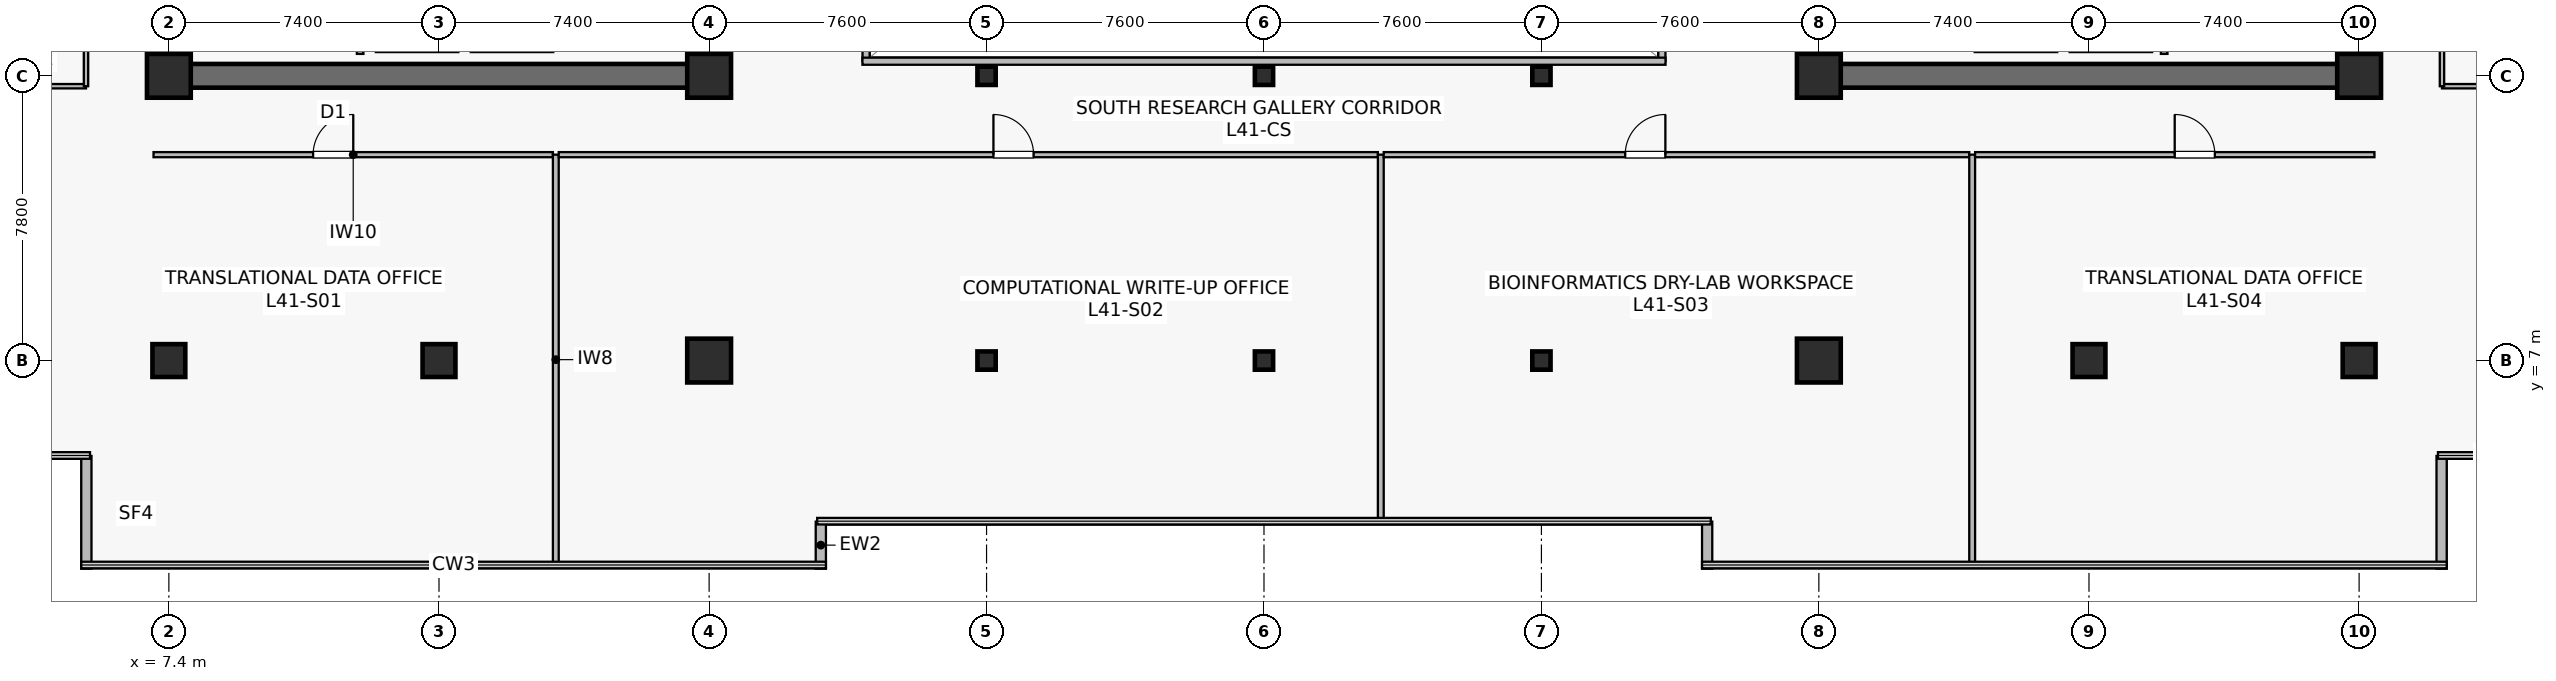
"""IFC4 building model, lengths in metres.
Left out: names, types, materials, properties, quantities, classifications, styles, units other than length and angle.
Written with IfcOpenShell. Run it as: python <this file> out.ifc"""

import sys

from ifc_helpers import new_model, si_unit, direction, frame, frame_2d, origin, origin_2d, place, context, subcontext, project, spatial, rectangle, hollow_rectangle, extrude, source, transform, mapped, element, fill, save


model = new_model("IFC4")
c1 = context("Model", 3, precision=1e-05, world=origin(), true_north=direction((0.0, 1.0)))
c2 = subcontext(c1, "Body", "Model", "MODEL_VIEW")
j1 = project(units=[si_unit("LENGTHUNIT", "METRE"), si_unit("PLANEANGLEUNIT", "RADIAN")], contexts=[c1])
p1 = place(None, origin())
s1 = spatial("IfcSite", under=j1, at=p1, CompositionType="ELEMENT")
p2 = place(p1, origin())
s2 = spatial("IfcBuilding", under=s1, at=p2, CompositionType="ELEMENT")
p3 = place(p2, frame((0.0, 0.0, 170.7)))
s3 = spatial("IfcBuildingStorey", under=s2, at=p3, CompositionType="ELEMENT", Elevation=170.7)
p4 = place(p3, frame((7.075, 14.8, 0.0), z_axis=(0.0, 0.0, 1.0), x_axis=(1.0, 0.0, 0.0)))
e1 = element("IfcWall", 1, at=p4, inside=s3, PredefinedType="SHEAR", context=c2, shape_type="SweptSolid", body=[
    extrude(rectangle(XDim=15.45, YDim=0.65, at=frame_2d((7.725, 0.0))), origin(), (0.0, 0.0, 1.0), 3.79),
])
p5 = place(p3, frame((7.4, 15.125, 0.0), z_axis=(0.0, 0.0, 1.0), x_axis=(0.0, 1.0, 0.0)))
e2 = element("IfcWall", 2, at=p5, inside=s3, PredefinedType="SHEAR", context=c2, shape_type="SweptSolid", body=[
    extrude(rectangle(XDim=18.35, YDim=0.65, at=frame_2d((9.175, 0.0))), origin(), (0.0, 0.0, 1.0), 3.79),
])
p6 = place(p3, frame((22.2, 15.125, 0.0), z_axis=(0.0, 0.0, 1.0), x_axis=(0.0, 1.0, 0.0)))
e3 = element("IfcWall", 3, at=p6, inside=s3, PredefinedType="SHEAR", context=c2, shape_type="SweptSolid", body=[
    extrude(rectangle(XDim=18.35, YDim=0.65, at=frame_2d((9.175, 0.0))), origin(), (0.0, 0.0, 1.0), 3.79),
])
p7 = place(p6, frame((3.425, 0.0, 0.0)))
e4 = element("IfcOpeningElement", 4, at=p7, cuts=e3, PredefinedType="OPENING", context=c2, shape_type="SweptSolid", body=[
    extrude(rectangle(XDim=1.42, YDim=2.2, at=frame_2d((0.71, 1.1))), frame((0.0, 0.335, 0.0), z_axis=(0.0, -1.0, 0.0), x_axis=(1.0, 0.0, 0.0)), (0.0, 0.0, 1.0), 0.67),
])
p8 = place(p3, frame((52.275, 14.8, 0.0), z_axis=(0.0, 0.0, 1.0), x_axis=(1.0, 0.0, 0.0)))
e5 = element("IfcWall", 5, at=p8, inside=s3, PredefinedType="SHEAR", context=c2, shape_type="SweptSolid", body=[
    extrude(rectangle(XDim=15.45, YDim=0.65, at=frame_2d((7.725, 0.0))), origin(), (0.0, 0.0, 1.0), 3.79),
])
p9 = place(p3, frame((52.6, 15.125, 0.0), z_axis=(0.0, 0.0, 1.0), x_axis=(0.0, 1.0, 0.0)))
e6 = element("IfcWall", 6, at=p9, inside=s3, PredefinedType="SHEAR", context=c2, shape_type="SweptSolid", body=[
    extrude(rectangle(XDim=18.35, YDim=0.65, at=frame_2d((9.175, 0.0))), origin(), (0.0, 0.0, 1.0), 3.79),
])
p10 = place(p9, frame((3.425, 0.0, 0.0)))
e7 = element("IfcOpeningElement", 7, at=p10, cuts=e6, PredefinedType="OPENING", context=c2, shape_type="SweptSolid", body=[
    extrude(rectangle(XDim=1.42, YDim=2.2, at=frame_2d((0.71, 1.1))), frame((0.0, 0.335, 0.0), z_axis=(0.0, -1.0, 0.0), x_axis=(1.0, 0.0, 0.0)), (0.0, 0.0, 1.0), 0.67),
])
p11 = place(p3, frame((67.4, 15.125, 0.0), z_axis=(0.0, 0.0, 1.0), x_axis=(0.0, 1.0, 0.0)))
e8 = element("IfcWall", 8, at=p11, inside=s3, PredefinedType="SHEAR", context=c2, shape_type="SweptSolid", body=[
    extrude(rectangle(XDim=18.35, YDim=0.65, at=frame_2d((9.175, 0.0))), origin(), (0.0, 0.0, 1.0), 3.79),
])
m1 = source(origin(), c2, "Body", "SweptSolid", [
    extrude(rectangle(XDim=0.9, YDim=0.9, at=origin_2d()), origin(), (0.0, 0.0, 1.0), 4.1),
])
p12 = place(p3, frame((14.8, 7.0, 0.0), z_axis=(0.0, 0.0, 1.0), x_axis=(1.0, 0.0, 0.0)))
e9 = element("IfcColumn", 9, at=p12, inside=s3, PredefinedType="COLUMN", context=c2, shape_type="MappedRepresentation", body=[
    mapped(m1, transform((0.0, 0.0, 0.0), scale=1.0)),
])
m2 = source(origin(), c2, "Body", "SweptSolid", [
    extrude(rectangle(XDim=1.2, YDim=1.2, at=origin_2d()), origin(), (0.0, 0.0, 1.0), 4.1),
])
for number, where, z_axis, x_axis in (
    (10, (22.2, 7.0, 0.0), (0.0, 0.0, 1.0), (1.0, 0.0, 0.0)),
    (11, (7.4, 14.8, 0.0), (0.0, 0.0, 1.0), (1.0, 0.0, 0.0)),
    (12, (22.2, 14.8, 0.0), (0.0, 0.0, 1.0), (1.0, 0.0, 0.0)),
    (13, (52.6, 7.0, 0.0), (0.0, 0.0, 1.0), (1.0, 0.0, 0.0)),
):
    element("IfcColumn", number, at=place(p3, frame(where, z_axis=z_axis, x_axis=x_axis)), inside=s3, PredefinedType="COLUMN", context=c2, shape_type="MappedRepresentation", body=[
        mapped(m2, transform((0.0, 0.0, 0.0), scale=1.0)),
    ])
p13 = place(p3, frame((60.0, 7.0, 0.0), z_axis=(0.0, 0.0, 1.0), x_axis=(1.0, 0.0, 0.0)))
e14 = element("IfcColumn", 14, at=p13, inside=s3, PredefinedType="COLUMN", context=c2, shape_type="MappedRepresentation", body=[
    mapped(m1, transform((0.0, 0.0, 0.0), scale=1.0)),
])
for number, where, z_axis, x_axis in (
    (15, (52.6, 14.8, 0.0), (0.0, 0.0, 1.0), (1.0, 0.0, 0.0)),
    (16, (67.4, 14.8, 0.0), (0.0, 0.0, 1.0), (1.0, 0.0, 0.0)),
):
    element("IfcColumn", number, at=place(p3, frame(where, z_axis=z_axis, x_axis=x_axis)), inside=s3, PredefinedType="COLUMN", context=c2, shape_type="MappedRepresentation", body=[
        mapped(m2, transform((0.0, 0.0, 0.0), scale=1.0)),
    ])
for number, where, z_axis, x_axis in (
    (17, (7.4, 7.0, 0.0), (0.0, 0.0, 1.0), (1.0, 0.0, 0.0)),
    (18, (67.4, 7.0, 0.0), (0.0, 0.0, 1.0), (1.0, 0.0, 0.0)),
):
    element("IfcColumn", number, at=place(p3, frame(where, z_axis=z_axis, x_axis=x_axis)), inside=s3, PredefinedType="COLUMN", context=c2, shape_type="MappedRepresentation", body=[
        mapped(m1, transform((0.0, 0.0, 0.0), scale=1.0)),
    ])
m3 = source(origin(), c2, "Body", "SweptSolid", [
    extrude(hollow_rectangle(XDim=0.5, YDim=0.5, WallThickness=0.022, at=origin_2d()), origin(), (0.0, 0.0, 1.0), 4.1),
])
for number, where, z_axis, x_axis in (
    (19, (29.8, 7.0, 0.0), (0.0, 0.0, 1.0), (1.0, 0.0, 0.0)),
    (20, (29.8, 14.8, 0.0), (0.0, 0.0, 1.0), (1.0, 0.0, 0.0)),
    (21, (37.4, 7.0, 0.0), (0.0, 0.0, 1.0), (1.0, 0.0, 0.0)),
    (22, (37.4, 14.8, 0.0), (0.0, 0.0, 1.0), (1.0, 0.0, 0.0)),
    (23, (45.0, 7.0, 0.0), (0.0, 0.0, 1.0), (1.0, 0.0, 0.0)),
    (24, (45.0, 14.8, 0.0), (0.0, 0.0, 1.0), (1.0, 0.0, 0.0)),
):
    element("IfcColumn", number, at=place(p3, frame(where, z_axis=z_axis, x_axis=x_axis)), inside=s3, PredefinedType="COLUMN", context=c2, shape_type="MappedRepresentation", body=[
        mapped(m3, transform((0.0, 0.0, 0.0), scale=1.0)),
    ])
for number, where, z_axis, x_axis in (
    (25, (25.26, 1.3, 0.0), (0.0, 0.0, 1.0), (0.0, 1.0, 0.0)),
    (26, (49.54, 2.588, 0.0), (0.0, 0.0, 1.0), (0.0, -1.0, 0.0)),
):
    element("IfcWall", number, at=place(p3, frame(where, z_axis=z_axis, x_axis=x_axis)), inside=s3, PredefinedType="STANDARD", context=c2, shape_type="SweptSolid", body=[
        extrude(rectangle(XDim=1.288, YDim=0.28, at=frame_2d((0.644, 0.0))), origin(), (0.0, 0.0, 1.0), 3.79),
    ])
for number, where, z_axis, x_axis in (
    (27, (69.66, 1.3, 0.0), (0.0, 0.0, 1.0), (0.0, 1.0, 0.0)),
    (28, (5.14, 4.388, 0.0), (0.0, 0.0, 1.0), (0.0, -1.0, 0.0)),
):
    element("IfcWall", number, at=place(p3, frame(where, z_axis=z_axis, x_axis=x_axis)), inside=s3, PredefinedType="STANDARD", context=c2, shape_type="SweptSolid", body=[
        extrude(rectangle(XDim=3.088, YDim=0.28, at=frame_2d((1.544, 0.0))), origin(), (0.0, 0.0, 1.0), 3.79),
    ])
p14 = place(p3, frame((13.07, 15.55, 0.0), z_axis=(0.0, 0.0, 1.0), x_axis=(1.0, 0.0, 0.0)))
e29 = element("IfcWall", 29, at=p14, inside=s3, PredefinedType="SOLIDWALL", context=c2, shape_type="SweptSolid", body=[
    extrude(rectangle(XDim=2.26, YDim=0.2, at=frame_2d((1.13, 0.0))), origin(), (0.0, 0.0, 1.0), 3.187),
])
p15 = place(p3, frame((15.67, 15.55, 0.0), z_axis=(0.0, 0.0, 1.0), x_axis=(1.0, 0.0, 0.0)))
e30 = element("IfcWall", 30, at=p15, inside=s3, PredefinedType="SOLIDWALL", context=c2, shape_type="SweptSolid", body=[
    extrude(rectangle(XDim=2.26, YDim=0.2, at=frame_2d((1.13, 0.0))), origin(), (0.0, 0.0, 1.0), 3.79),
])
p16 = place(p3, frame((12.64, 15.4, 0.0), z_axis=(0.0, 0.0, 1.0), x_axis=(0.0, 1.0, 0.0)))
e31 = element("IfcWall", 31, at=p16, inside=s3, PredefinedType="SOLIDWALL", context=c2, shape_type="SweptSolid", body=[
    extrude(rectangle(XDim=2.4, YDim=0.18, at=frame_2d((1.2, 0.0))), origin(), (0.0, 0.0, 1.0), 3.79),
])
p17 = place(p3, frame((59.47, 15.55, 0.0), z_axis=(0.0, 0.0, 1.0), x_axis=(1.0, 0.0, 0.0)))
e32 = element("IfcWall", 32, at=p17, inside=s3, PredefinedType="SOLIDWALL", context=c2, shape_type="SweptSolid", body=[
    extrude(rectangle(XDim=2.26, YDim=0.2, at=frame_2d((1.13, 0.0))), origin(), (0.0, 0.0, 1.0), 3.187),
])
p18 = place(p3, frame((56.87, 15.55, 0.0), z_axis=(0.0, 0.0, 1.0), x_axis=(1.0, 0.0, 0.0)))
e33 = element("IfcWall", 33, at=p18, inside=s3, PredefinedType="SOLIDWALL", context=c2, shape_type="SweptSolid", body=[
    extrude(rectangle(XDim=2.26, YDim=0.2, at=frame_2d((1.13, 0.0))), origin(), (0.0, 0.0, 1.0), 3.79),
])
p19 = place(p3, frame((62.06, 15.4, 0.0), z_axis=(0.0, 0.0, 1.0), x_axis=(0.0, 1.0, 0.0)))
e34 = element("IfcWall", 34, at=p19, inside=s3, PredefinedType="SOLIDWALL", context=c2, shape_type="SweptSolid", body=[
    extrude(rectangle(XDim=2.4, YDim=0.18, at=frame_2d((1.2, 0.0))), origin(), (0.0, 0.0, 1.0), 3.79),
])
p20 = place(p3, frame((26.5, 15.2, 0.0), z_axis=(0.0, 0.0, 1.0), x_axis=(0.0, 1.0, 0.0)))
e35 = element("IfcWall", 35, at=p20, inside=s3, PredefinedType="SOLIDWALL", context=c2, shape_type="SweptSolid", body=[
    extrude(rectangle(XDim=18.2, YDim=0.195, at=frame_2d((9.1, 0.0))), origin(), (0.0, 0.0, 1.0), 3.79),
])
p21 = place(p20, frame((1.8, 0.0, 0.9)))
e36 = element("IfcOpeningElement", 36, at=p21, cuts=e35, PredefinedType="OPENING", context=c2, shape_type="SweptSolid", body=[
    extrude(rectangle(XDim=1.2, YDim=1.35, at=frame_2d((0.6, 0.675))), frame((0.0, 0.107, 0.0), z_axis=(0.0, -1.0, 0.0), x_axis=(1.0, 0.0, 0.0)), (0.0, 0.0, 1.0), 0.215),
])
p22 = place(p20, frame((13.2, 0.0, 0.9)))
e37 = element("IfcOpeningElement", 37, at=p22, cuts=e35, PredefinedType="OPENING", context=c2, shape_type="SweptSolid", body=[
    extrude(rectangle(XDim=1.2, YDim=1.35, at=frame_2d((0.6, 0.675))), frame((0.0, 0.107, 0.0), z_axis=(0.0, -1.0, 0.0), x_axis=(1.0, 0.0, 0.0)), (0.0, 0.0, 1.0), 0.215),
])
p23 = place(p3, frame((48.3, 15.2, 0.0), z_axis=(0.0, 0.0, 1.0), x_axis=(0.0, 1.0, 0.0)))
e38 = element("IfcWall", 38, at=p23, inside=s3, PredefinedType="SOLIDWALL", context=c2, shape_type="SweptSolid", body=[
    extrude(rectangle(XDim=18.2, YDim=0.195, at=frame_2d((9.1, 0.0))), origin(), (0.0, 0.0, 1.0), 3.79),
])
p24 = place(p23, frame((1.8, 0.0, 0.9)))
e39 = element("IfcOpeningElement", 39, at=p24, cuts=e38, PredefinedType="OPENING", context=c2, shape_type="SweptSolid", body=[
    extrude(rectangle(XDim=1.2, YDim=1.35, at=frame_2d((0.6, 0.675))), frame((0.0, 0.107, 0.0), z_axis=(0.0, -1.0, 0.0), x_axis=(1.0, 0.0, 0.0)), (0.0, 0.0, 1.0), 0.215),
])
p25 = place(p23, frame((13.2, 0.0, 0.9)))
e40 = element("IfcOpeningElement", 40, at=p25, cuts=e38, PredefinedType="OPENING", context=c2, shape_type="SweptSolid", body=[
    extrude(rectangle(XDim=1.2, YDim=1.35, at=frame_2d((0.6, 0.675))), frame((0.0, 0.107, 0.0), z_axis=(0.0, -1.0, 0.0), x_axis=(1.0, 0.0, 0.0)), (0.0, 0.0, 1.0), 0.215),
])
p26 = place(p3, frame((26.4, 15.2, 0.0), z_axis=(0.0, 0.0, 1.0), x_axis=(1.0, 0.0, 0.0)))
e41 = element("IfcWall", 41, at=p26, inside=s3, PredefinedType="SOLIDWALL", context=c2, shape_type="SweptSolid", body=[
    extrude(rectangle(XDim=22.0, YDim=0.195, at=frame_2d((11.0, 0.0))), origin(), (0.0, 0.0, 1.0), 3.79),
])
p27 = place(p3, frame((6.98, 12.64, 0.0), z_axis=(0.0, 0.0, 1.0), x_axis=(1.0, 0.0, 0.0)))
e42 = element("IfcWall", 42, at=p27, inside=s3, PredefinedType="PARTITIONING", context=c2, shape_type="SweptSolid", body=[
    extrude(rectangle(XDim=10.94, YDim=0.14, at=frame_2d((5.47, 0.0))), origin(), (0.0, 0.0, 1.0), 3.187),
])
p28 = place(p27, frame((4.372, 0.0, 0.0)))
e43 = element("IfcOpeningElement", 43, at=p28, cuts=e42, PredefinedType="OPENING", context=c2, shape_type="SweptSolid", body=[
    extrude(rectangle(XDim=1.1, YDim=2.18, at=frame_2d((0.55, 1.09))), frame((0.0, 0.08, 0.0), z_axis=(0.0, -1.0, 0.0), x_axis=(1.0, 0.0, 0.0)), (0.0, 0.0, 1.0), 0.16),
])
p29 = place(p3, frame((18.0, 1.41, 0.0), z_axis=(0.0, 0.0, 1.0), x_axis=(0.0, 1.0, 0.0)))
e44 = element("IfcWall", 44, at=p29, inside=s3, PredefinedType="PARTITIONING", context=c2, shape_type="SweptSolid", body=[
    extrude(rectangle(XDim=11.23, YDim=0.16, at=frame_2d((5.615, 0.0))), origin(), (0.0, 0.0, 1.0), 3.075),
])
p30 = place(p3, frame((18.08, 12.64, 0.0), z_axis=(0.0, 0.0, 1.0), x_axis=(1.0, 0.0, 0.0)))
e45 = element("IfcWall", 45, at=p30, inside=s3, PredefinedType="PARTITIONING", context=c2, shape_type="SweptSolid", body=[
    extrude(rectangle(XDim=22.44, YDim=0.14, at=frame_2d((11.22, 0.0))), origin(), (0.0, 0.0, 1.0), 3.187),
])
p31 = place(p30, frame((11.908, 0.0, 0.0)))
e46 = element("IfcOpeningElement", 46, at=p31, cuts=e45, PredefinedType="OPENING", context=c2, shape_type="SweptSolid", body=[
    extrude(rectangle(XDim=1.1, YDim=2.18, at=frame_2d((0.55, 1.09))), frame((0.0, 0.08, 0.0), z_axis=(0.0, -1.0, 0.0), x_axis=(1.0, 0.0, 0.0)), (0.0, 0.0, 1.0), 0.16),
])
p32 = place(p3, frame((40.6, 2.61, 0.0), z_axis=(0.0, 0.0, 1.0), x_axis=(0.0, 1.0, 0.0)))
e47 = element("IfcWall", 47, at=p32, inside=s3, PredefinedType="PARTITIONING", context=c2, shape_type="SweptSolid", body=[
    extrude(rectangle(XDim=10.03, YDim=0.16, at=frame_2d((5.015, 0.0))), origin(), (0.0, 0.0, 1.0), 3.075),
])
p33 = place(p3, frame((40.68, 12.64, 0.0), z_axis=(0.0, 0.0, 1.0), x_axis=(1.0, 0.0, 0.0)))
e48 = element("IfcWall", 48, at=p33, inside=s3, PredefinedType="PARTITIONING", context=c2, shape_type="SweptSolid", body=[
    extrude(rectangle(XDim=16.04, YDim=0.14, at=frame_2d((8.02, 0.0))), origin(), (0.0, 0.0, 1.0), 3.187),
])
p34 = place(p33, frame((6.615, 0.0, 0.0)))
e49 = element("IfcOpeningElement", 49, at=p34, cuts=e48, PredefinedType="OPENING", context=c2, shape_type="SweptSolid", body=[
    extrude(rectangle(XDim=1.1, YDim=2.18, at=frame_2d((0.55, 1.09))), frame((0.0, 0.08, 0.0), z_axis=(0.0, -1.0, 0.0), x_axis=(1.0, 0.0, 0.0)), (0.0, 0.0, 1.0), 0.16),
])
p35 = place(p3, frame((56.8, 1.41, 0.0), z_axis=(0.0, 0.0, 1.0), x_axis=(0.0, 1.0, 0.0)))
e50 = element("IfcWall", 50, at=p35, inside=s3, PredefinedType="PARTITIONING", context=c2, shape_type="SweptSolid", body=[
    extrude(rectangle(XDim=11.23, YDim=0.16, at=frame_2d((5.615, 0.0))), origin(), (0.0, 0.0, 1.0), 3.075),
])
p36 = place(p3, frame((56.88, 12.64, 0.0), z_axis=(0.0, 0.0, 1.0), x_axis=(1.0, 0.0, 0.0)))
e51 = element("IfcWall", 51, at=p36, inside=s3, PredefinedType="PARTITIONING", context=c2, shape_type="SweptSolid", body=[
    extrude(rectangle(XDim=10.94, YDim=0.14, at=frame_2d((5.47, 0.0))), origin(), (0.0, 0.0, 1.0), 3.187),
])
p37 = place(p36, frame((5.469, 0.0, 0.0)))
e52 = element("IfcOpeningElement", 52, at=p37, cuts=e51, PredefinedType="OPENING", context=c2, shape_type="SweptSolid", body=[
    extrude(rectangle(XDim=1.1, YDim=2.18, at=frame_2d((0.55, 1.09))), frame((0.0, 0.08, 0.0), z_axis=(0.0, -1.0, 0.0), x_axis=(1.0, 0.0, 0.0)), (0.0, 0.0, 1.0), 0.16),
])
p38 = place(p3, frame((2.11, 14.515, 0.0), z_axis=(0.0, 0.0, 1.0), x_axis=(1.0, 0.0, 0.0)))
e53 = element("IfcWall", 53, at=p38, inside=s3, PredefinedType="PARTITIONING", context=c2, shape_type="SweptSolid", body=[
    extrude(rectangle(XDim=3.02, YDim=0.12, at=frame_2d((1.51, 0.0))), origin(), (0.0, 0.0, 1.0), 3.79),
])
p39 = place(p3, frame((5.13, 14.515, 0.0), z_axis=(0.0, 0.0, 1.0), x_axis=(0.0, 1.0, 0.0)))
e54 = element("IfcWall", 54, at=p39, inside=s3, PredefinedType="PARTITIONING", context=c2, shape_type="SweptSolid", body=[
    extrude(rectangle(XDim=9.625, YDim=0.12, at=frame_2d((4.812, 0.0))), origin(), (0.0, 0.0, 1.0), 3.79),
])
p40 = place(p39, frame((4.363, 0.0, 0.0)))
e55 = element("IfcOpeningElement", 55, at=p40, cuts=e54, PredefinedType="OPENING", context=c2, shape_type="SweptSolid", body=[
    extrude(rectangle(XDim=0.9, YDim=2.1, at=frame_2d((0.45, 1.05))), frame((0.0, 0.07, 0.0), z_axis=(0.0, -1.0, 0.0), x_axis=(1.0, 0.0, 0.0)), (0.0, 0.0, 1.0), 0.14),
])
p41 = place(p3, frame((69.67, 14.515, 0.0), z_axis=(0.0, 0.0, 1.0), x_axis=(1.0, 0.0, 0.0)))
e56 = element("IfcWall", 56, at=p41, inside=s3, PredefinedType="PARTITIONING", context=c2, shape_type="SweptSolid", body=[
    extrude(rectangle(XDim=3.02, YDim=0.12, at=frame_2d((1.51, 0.0))), origin(), (0.0, 0.0, 1.0), 3.79),
])
p42 = place(p3, frame((69.67, 14.515, 0.0), z_axis=(0.0, 0.0, 1.0), x_axis=(0.0, 1.0, 0.0)))
e57 = element("IfcWall", 57, at=p42, inside=s3, PredefinedType="PARTITIONING", context=c2, shape_type="SweptSolid", body=[
    extrude(rectangle(XDim=5.825, YDim=0.12, at=frame_2d((2.913, 0.0))), origin(), (0.0, 0.0, 1.0), 3.79),
])
p43 = place(p42, frame((2.462, 0.0, 0.0)))
e58 = element("IfcOpeningElement", 58, at=p43, cuts=e57, PredefinedType="OPENING", context=c2, shape_type="SweptSolid", body=[
    extrude(rectangle(XDim=0.9, YDim=2.1, at=frame_2d((0.45, 1.05))), frame((0.0, 0.07, 0.0), z_axis=(0.0, -1.0, 0.0), x_axis=(1.0, 0.0, 0.0)), (0.0, 0.0, 1.0), 0.14),
])
m4 = source(origin(), c2, "Body", "SweptSolid", [
    extrude(rectangle(XDim=1.1, YDim=2.18, at=frame_2d((0.55, 1.09))), frame((0.0, 0.025, 0.0), z_axis=(0.0, -1.0, 0.0), x_axis=(1.0, 0.0, 0.0)), (0.0, 0.0, 1.0), 0.05),
])
p44 = place(p28, origin())
e59 = element("IfcDoor", 59, at=p44, inside=s3, OperationType="SINGLE_SWING_RIGHT", PredefinedType="DOOR", context=c2, shape_type="MappedRepresentation", body=[
    mapped(m4, transform((0.0, 0.0, 0.0), scale=1.0)),
])
fill(e43, e59)
p45 = place(p31, origin())
e60 = element("IfcDoor", 60, at=p45, inside=s3, OperationType="SINGLE_SWING_LEFT", PredefinedType="DOOR", context=c2, shape_type="MappedRepresentation", body=[
    mapped(m4, transform((0.0, 0.0, 0.0), scale=1.0)),
])
fill(e46, e60)
p46 = place(p34, origin())
e61 = element("IfcDoor", 61, at=p46, inside=s3, OperationType="SINGLE_SWING_RIGHT", PredefinedType="DOOR", context=c2, shape_type="MappedRepresentation", body=[
    mapped(m4, transform((0.0, 0.0, 0.0), scale=1.0)),
])
fill(e49, e61)
p47 = place(p37, origin())
e62 = element("IfcDoor", 62, at=p47, inside=s3, OperationType="SINGLE_SWING_LEFT", PredefinedType="DOOR", context=c2, shape_type="MappedRepresentation", body=[
    mapped(m4, transform((0.0, 0.0, 0.0), scale=1.0)),
])
fill(e52, e62)
save(model, sys.argv[1])
